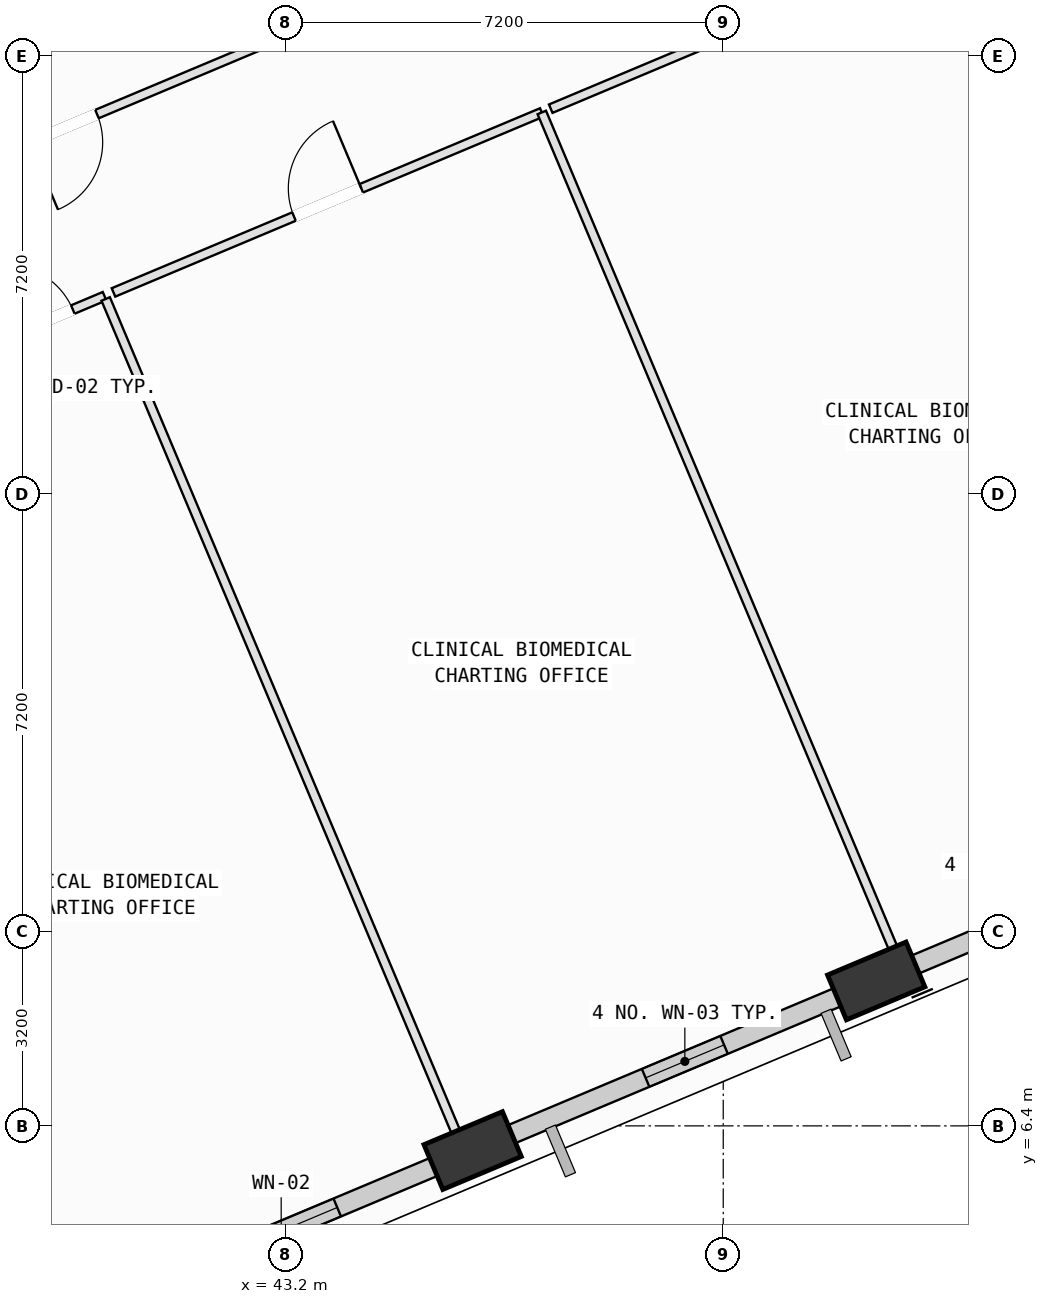
"""IFC4 building model, lengths in metres.
Left out: names, types, materials, properties, quantities, classifications, styles, units other than length and angle.
Written with IfcOpenShell. Run it as: python <this file> out.ifc"""

import sys

from ifc_helpers import new_model, si_unit, direction, frame, frame_2d, origin, origin_2d, place, context, subcontext, project, spatial, rectangle, extrude, element, fill, save


model = new_model("IFC4")
c1 = context("Model", 3, precision=1e-05, world=origin(), true_north=direction((0.0, 1.0)))
c2 = subcontext(c1, "Body", "Model", "MODEL_VIEW")
j1 = project(units=[si_unit("LENGTHUNIT", "METRE"), si_unit("PLANEANGLEUNIT", "RADIAN")], contexts=[c1])
p1 = place(None, origin())
s1 = spatial("IfcSite", under=j1, at=p1, CompositionType="ELEMENT")
p2 = place(p1, origin())
s2 = spatial("IfcBuilding", under=s1, at=p2, CompositionType="ELEMENT")
p3 = place(p2, frame((0.0, 0.0, 120.4)))
s3 = spatial("IfcBuildingStorey", under=s2, at=p3, CompositionType="ELEMENT", Elevation=120.4)
p4 = place(p3, frame((46.279, 5.994, 0.002), z_axis=(0.077184132072, 0.052976658026, 0.995608398649), x_axis=(-0.83977209716, 0.541725725919, 0.036277578595)))
e1 = element("IfcColumn", 1, at=p4, inside=s3, PredefinedType="COLUMN", context=c2, shape_type="SweptSolid", body=[
    extrude(rectangle(XDim=1.4, YDim=0.8, at=origin_2d()), origin(), (0.0, 0.0, 1.0), 4.014),
])
p5 = place(p3, frame((52.916, 8.784, 0.002), z_axis=(0.065381443896, 0.080146955854, 0.994636482471), x_axis=(-0.957968030834, 0.28406110417, 0.040081679075)))
e2 = element("IfcColumn", 2, at=p5, inside=s3, PredefinedType="COLUMN", context=c2, shape_type="SweptSolid", body=[
    extrude(rectangle(XDim=1.4, YDim=0.8, at=origin_2d()), origin(), (0.0, 0.0, 1.0), 4.018),
])
p6 = place(p3, frame((45.992, 5.873, 0.0), z_axis=(0.0, 0.0, 1.0), x_axis=(-0.921868356039, -0.387503205321, 0.0)))
e3 = element("IfcWall", 3, at=p6, inside=s3, PredefinedType="SOLIDWALL", context=c2, shape_type="SweptSolid", body=[
    extrude(rectangle(XDim=6.209, YDim=0.32, at=frame_2d((3.104, 0.0))), origin(), (0.0, 0.0, 1.0), 3.165),
])
p7 = place(p6, frame((2.105, 0.0, 0.75)))
e4 = element("IfcOpeningElement", 4, at=p7, cuts=e3, PredefinedType="OPENING", context=c2, shape_type="SweptSolid", body=[
    extrude(rectangle(XDim=2.0, YDim=1.95, at=frame_2d((1.0, 0.975))), frame((0.0, 0.17, 0.0), z_axis=(0.0, -1.0, 0.0), x_axis=(1.0, 0.0, 0.0)), (0.0, 0.0, 1.0), 0.34),
])
p8 = place(p3, frame((52.637, 8.667, 0.0), z_axis=(0.0, 0.0, 1.0), x_axis=(-0.921850291978, -0.387546176836, 0.0)))
e5 = element("IfcWall", 5, at=p8, inside=s3, PredefinedType="SOLIDWALL", context=c2, shape_type="SweptSolid", body=[
    extrude(rectangle(XDim=6.219, YDim=0.32, at=frame_2d((3.109, 0.0))), origin(), (0.0, 0.0, 1.0), 3.165),
])
p9 = place(p8, frame((2.411, 0.0, 0.75)))
e6 = element("IfcOpeningElement", 6, at=p9, cuts=e5, PredefinedType="OPENING", context=c2, shape_type="SweptSolid", body=[
    extrude(rectangle(XDim=1.4, YDim=1.85, at=frame_2d((0.7, 0.925))), frame((0.0, 0.17, 0.0), z_axis=(0.0, -1.0, 0.0), x_axis=(1.0, 0.0, 0.0)), (0.0, 0.0, 1.0), 0.34),
])
p10 = place(p3, frame((59.288, 11.462, 0.0), z_axis=(0.0, 0.0, 1.0), x_axis=(-0.92186784653, -0.387504417438, 0.0)))
e7 = element("IfcWall", 7, at=p10, inside=s3, PredefinedType="SOLIDWALL", context=c2, shape_type="SweptSolid", body=[
    extrude(rectangle(XDim=6.242, YDim=0.32, at=frame_2d((3.121, 0.0))), origin(), (0.0, 0.0, 1.0), 3.165),
])
p11 = place(p10, frame((3.14, 0.0, 0.75)))
e8 = element("IfcOpeningElement", 8, at=p11, cuts=e7, PredefinedType="OPENING", context=c2, shape_type="SweptSolid", body=[
    extrude(rectangle(XDim=1.8, YDim=2.05, at=frame_2d((0.9, 1.025))), frame((0.0, 0.17, 0.0), z_axis=(0.0, -1.0, 0.0), x_axis=(1.0, 0.0, 0.0)), (0.0, 0.0, 1.0), 0.34),
])
p12 = place(p3, frame((53.79, 31.476, 0.0), z_axis=(0.0, 0.0, 1.0), x_axis=(0.523829209883, -0.851823314352, 0.0)))
e9 = element("IfcWall", 9, at=p12, inside=s3, PredefinedType="SOLIDWALL", context=c2, shape_type="SweptSolid", body=[
    extrude(rectangle(XDim=8.838, YDim=0.32, at=frame_2d((4.419, 0.0))), origin(), (0.0, 0.0, 1.0), 3.165),
])
p13 = place(p3, frame((34.96, 23.907, 0.0), z_axis=(0.0, 0.0, 1.0), x_axis=(0.921853504895, 0.38753853423, 0.0)))
e10 = element("IfcWall", 10, at=p13, inside=s3, PredefinedType="SOLIDWALL", context=c2, shape_type="SweptSolid", body=[
    extrude(rectangle(XDim=6.211, YDim=0.32, at=frame_2d((3.105, 0.0))), origin(), (0.0, 0.0, 1.0), 3.165),
])
p14 = place(p13, frame((2.205, 0.0, 0.75)))
e11 = element("IfcOpeningElement", 11, at=p14, cuts=e10, PredefinedType="OPENING", context=c2, shape_type="SweptSolid", body=[
    extrude(rectangle(XDim=1.8, YDim=2.05, at=frame_2d((0.9, 1.025))), frame((0.0, 0.17, 0.0), z_axis=(0.0, -1.0, 0.0), x_axis=(1.0, 0.0, 0.0)), (0.0, 0.0, 1.0), 0.34),
])
p15 = place(p3, frame((38.076, 19.142, 0.0), z_axis=(0.0, 0.0, 1.0), x_axis=(0.921804802064, 0.387654365244, 0.0)))
e12 = element("IfcWall", 12, at=p15, inside=s3, PredefinedType="PARTITIONING", context=c2, shape_type="SweptSolid", body=[
    extrude(rectangle(XDim=2.332, YDim=0.15, at=frame_2d((1.166, 0.0))), origin(), (0.0, 0.0, 1.0), 2.945),
])
p16 = place(p15, frame((0.566, 0.0, 0.0)))
e13 = element("IfcOpeningElement", 13, at=p16, cuts=e12, PredefinedType="OPENING", context=c2, shape_type="SweptSolid", body=[
    extrude(rectangle(XDim=1.2, YDim=2.15, at=frame_2d((0.6, 1.075))), frame((0.0, 0.085, 0.0), z_axis=(0.0, -1.0, 0.0), x_axis=(1.0, 0.0, 0.0)), (0.0, 0.0, 1.0), 0.17),
])
p17 = place(p3, frame((40.244, 20.0, 0.0), z_axis=(0.0, 0.0, 1.0), x_axis=(0.387518279995, -0.921862019323, 0.0)))
e14 = element("IfcWall", 14, at=p17, inside=s3, PredefinedType="PARTITIONING", context=c2, shape_type="SweptSolid", body=[
    extrude(rectangle(XDim=15.481, YDim=0.15, at=frame_2d((7.74, 0.0))), origin(), (0.0, 0.0, 1.0), 3.78),
])
p18 = place(p3, frame((40.372, 20.108, 0.0), z_axis=(0.0, 0.0, 1.0), x_axis=(0.921900405163, 0.387426951774, 0.0)))
e15 = element("IfcWall", 15, at=p18, inside=s3, PredefinedType="PARTITIONING", context=c2, shape_type="SweptSolid", body=[
    extrude(rectangle(XDim=7.641, YDim=0.15, at=frame_2d((3.82, 0.0))), origin(), (0.0, 0.0, 1.0), 3.78),
])
p19 = place(p18, frame((3.22, 0.0, 0.0)))
e16 = element("IfcOpeningElement", 16, at=p19, cuts=e15, PredefinedType="OPENING", context=c2, shape_type="SweptSolid", body=[
    extrude(rectangle(XDim=1.2, YDim=2.15, at=frame_2d((0.6, 1.075))), frame((0.0, 0.085, 0.0), z_axis=(0.0, -1.0, 0.0), x_axis=(1.0, 0.0, 0.0)), (0.0, 0.0, 1.0), 0.17),
])
p20 = place(p3, frame((47.416, 23.068, 0.0), z_axis=(0.0, 0.0, 1.0), x_axis=(0.387521386552, -0.921860713429, 0.0)))
e17 = element("IfcWall", 17, at=p20, inside=s3, PredefinedType="PARTITIONING", context=c2, shape_type="SweptSolid", body=[
    extrude(rectangle(XDim=15.53, YDim=0.15, at=frame_2d((7.765, 0.0))), origin(), (0.0, 0.0, 1.0), 3.78),
])
p21 = place(p3, frame((53.434, 8.752, 0.0), z_axis=(0.0, 0.0, 1.0), x_axis=(-0.921754991199, -0.387772789401, 0.0)))
e18 = element("IfcWall", 18, at=p21, inside=s3, PredefinedType="PARTITIONING", context=c2, shape_type="SweptSolid", body=[
    extrude(rectangle(XDim=0.768, YDim=0.15, at=frame_2d((0.384, 0.0))), origin(), (0.0, 0.0, 1.0), 3.165),
])
p22 = place(p3, frame((46.994, 6.044, 0.0), z_axis=(0.0, 0.0, 1.0), x_axis=(-0.922112725335, -0.386921337969, 0.0)))
e19 = element("IfcWall", 19, at=p22, inside=s3, PredefinedType="PARTITIONING", context=c2, shape_type="SweptSolid", body=[
    extrude(rectangle(XDim=0.654, YDim=0.15, at=frame_2d((0.327, 0.0))), origin(), (0.0, 0.0, 1.0), 3.165),
])
p23 = place(p3, frame((47.563, 23.13, 0.0), z_axis=(0.0, 0.0, 1.0), x_axis=(0.921835553327, 0.387581233579, 0.0)))
e20 = element("IfcWall", 20, at=p23, inside=s3, PredefinedType="PARTITIONING", context=c2, shape_type="SweptSolid", body=[
    extrude(rectangle(XDim=7.64, YDim=0.15, at=frame_2d((3.82, 0.0))), origin(), (0.0, 0.0, 1.0), 3.78),
])
p24 = place(p23, frame((3.22, 0.0, 0.0)))
e21 = element("IfcOpeningElement", 21, at=p24, cuts=e20, PredefinedType="OPENING", context=c2, shape_type="SweptSolid", body=[
    extrude(rectangle(XDim=1.2, YDim=2.15, at=frame_2d((0.6, 1.075))), frame((0.0, 0.085, 0.0), z_axis=(0.0, -1.0, 0.0), x_axis=(1.0, 0.0, 0.0)), (0.0, 0.0, 1.0), 0.17),
])
p25 = place(p3, frame((44.851, 25.038, 0.0), z_axis=(0.0, 0.0, 1.0), x_axis=(-0.921889203051, -0.38745360664, 0.0)))
e22 = element("IfcWall", 22, at=p25, inside=s3, PredefinedType="PARTITIONING", context=c2, shape_type="SweptSolid", body=[
    extrude(rectangle(XDim=11.506, YDim=0.15, at=frame_2d((5.753, 0.0))), origin(), (0.0, 0.0, 1.0), 2.945),
])
p26 = place(p25, frame((5.153, 0.0, 0.0)))
e23 = element("IfcOpeningElement", 23, at=p26, cuts=e22, PredefinedType="OPENING", context=c2, shape_type="SweptSolid", body=[
    extrude(rectangle(XDim=1.2, YDim=2.15, at=frame_2d((0.6, 1.075))), frame((0.0, 0.085, 0.0), z_axis=(0.0, -1.0, 0.0), x_axis=(1.0, 0.0, 0.0)), (0.0, 0.0, 1.0), 0.17),
])
p27 = place(p7, origin())
e24 = element("IfcWindow", 24, at=p27, inside=s3, PartitioningType="SINGLE_PANEL", PredefinedType="WINDOW", context=c2, shape_type="SweptSolid", body=[
    extrude(rectangle(XDim=2.0, YDim=1.95, at=frame_2d((1.0, 0.975))), frame((0.0, 0.03, 0.0), z_axis=(0.0, -1.0, 0.0), x_axis=(1.0, 0.0, 0.0)), (0.0, 0.0, 1.0), 0.06),
])
fill(e4, e24)
p28 = place(p9, origin())
e25 = element("IfcWindow", 25, at=p28, inside=s3, PartitioningType="SINGLE_PANEL", PredefinedType="WINDOW", context=c2, shape_type="SweptSolid", body=[
    extrude(rectangle(XDim=1.4, YDim=1.85, at=frame_2d((0.7, 0.925))), frame((0.0, 0.03, 0.0), z_axis=(0.0, -1.0, 0.0), x_axis=(1.0, 0.0, 0.0)), (0.0, 0.0, 1.0), 0.06),
])
fill(e6, e25)
p29 = place(p16, origin())
e26 = element("IfcDoor", 26, at=p29, inside=s3, OperationType="SINGLE_SWING_LEFT", PredefinedType="DOOR", context=c2, shape_type="SweptSolid", body=[
    extrude(rectangle(XDim=1.2, YDim=2.15, at=frame_2d((0.6, 1.075))), frame((0.0, 0.025, 0.0), z_axis=(0.0, -1.0, 0.0), x_axis=(1.0, 0.0, 0.0)), (0.0, 0.0, 1.0), 0.05),
])
fill(e13, e26)
p30 = place(p19, origin())
e27 = element("IfcDoor", 27, at=p30, inside=s3, OperationType="SINGLE_SWING_RIGHT", PredefinedType="DOOR", context=c2, shape_type="SweptSolid", body=[
    extrude(rectangle(XDim=1.2, YDim=2.15, at=frame_2d((0.6, 1.075))), frame((0.0, 0.025, 0.0), z_axis=(0.0, -1.0, 0.0), x_axis=(1.0, 0.0, 0.0)), (0.0, 0.0, 1.0), 0.05),
])
fill(e16, e27)
p31 = place(p26, origin())
e28 = element("IfcDoor", 28, at=p31, inside=s3, OperationType="SINGLE_SWING_RIGHT", PredefinedType="DOOR", context=c2, shape_type="SweptSolid", body=[
    extrude(rectangle(XDim=1.2, YDim=2.15, at=frame_2d((0.6, 1.075))), frame((0.0, 0.025, 0.0), z_axis=(0.0, -1.0, 0.0), x_axis=(1.0, 0.0, 0.0)), (0.0, 0.0, 1.0), 0.05),
])
fill(e23, e28)
save(model, sys.argv[1])
